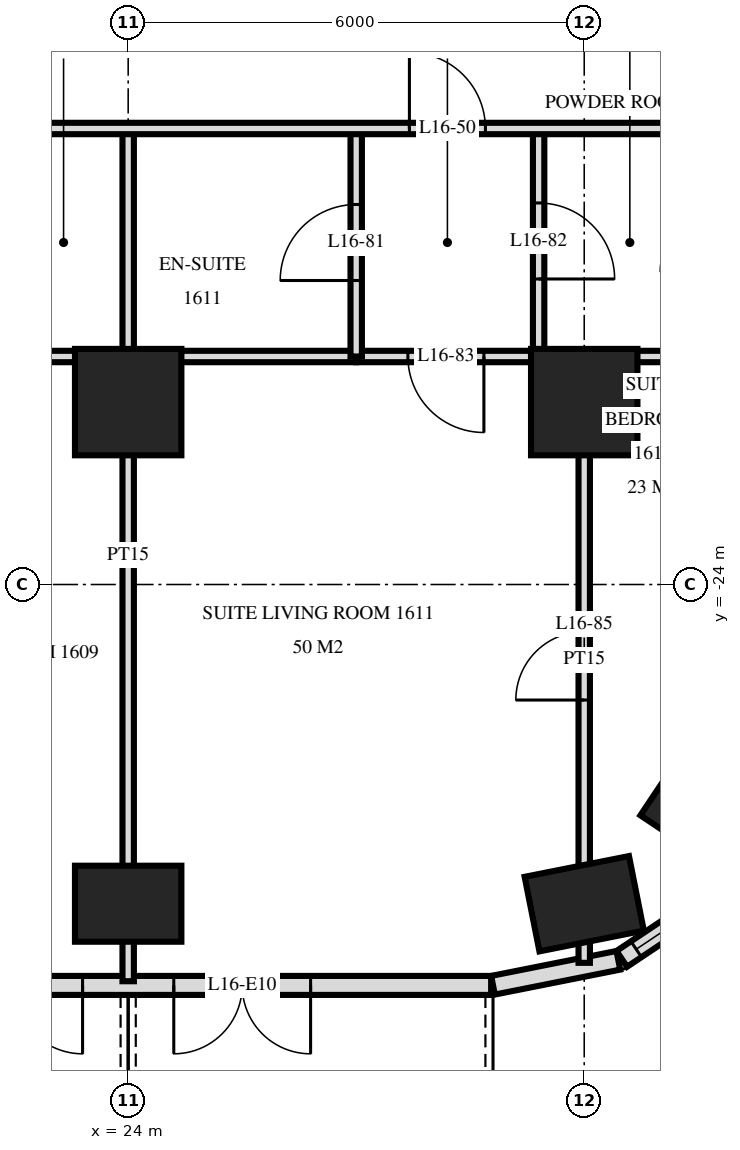
"""IFC4 building model, lengths in metres.
Left out: names, types, materials, properties, quantities, classifications, styles, units other than length and angle.
Written with IfcOpenShell. Run it as: python <this file> out.ifc"""

import sys

from ifc_helpers import new_model, si_unit, direction, frame, frame_2d, origin, origin_2d, place, context, subcontext, project, spatial, rectangle, extrude, element, fill, save


model = new_model("IFC4")
c1 = context("Model", 3, precision=1e-05, world=origin(), true_north=direction((0.0, 1.0)))
c2 = subcontext(c1, "Body", "Model", "MODEL_VIEW")
j1 = project(units=[si_unit("LENGTHUNIT", "METRE"), si_unit("PLANEANGLEUNIT", "RADIAN")], contexts=[c1])
p1 = place(None, origin())
s1 = spatial("IfcSite", under=j1, at=p1, CompositionType="ELEMENT")
p2 = place(p1, origin())
s2 = spatial("IfcBuilding", under=s1, at=p2, CompositionType="ELEMENT")
p3 = place(p2, frame((0.0, 0.0, 67.2)))
s3 = spatial("IfcBuildingStorey", under=s2, at=p3, CompositionType="ELEMENT", Elevation=67.2)
p4 = place(p3, frame((24.0, -28.2, 0.0), z_axis=(0.0, 0.0, 1.0), x_axis=(1.0, 0.0, 0.0)))
e1 = element("IfcColumn", 1, at=p4, inside=s3, PredefinedType="COLUMN", context=c2, shape_type="SweptSolid", body=[
    extrude(rectangle(XDim=1.4, YDim=1.0, at=origin_2d()), origin(), (0.0, 0.0, 1.0), 3.6),
])
p5 = place(p3, frame((24.0, -21.6, 0.0), z_axis=(0.0, 0.0, 1.0), x_axis=(1.0, 0.0, 0.0)))
e2 = element("IfcColumn", 2, at=p5, inside=s3, PredefinedType="COLUMN", context=c2, shape_type="SweptSolid", body=[
    extrude(rectangle(XDim=1.4, YDim=1.4, at=origin_2d()), origin(), (0.0, 0.0, 1.0), 3.6),
])
p6 = place(p3, frame((30.0, -28.2, 0.0), z_axis=(0.0, 0.0, 1.0), x_axis=(0.980792089743, 0.195056086032, 0.0)))
e3 = element("IfcColumn", 3, at=p6, inside=s3, PredefinedType="COLUMN", context=c2, shape_type="SweptSolid", body=[
    extrude(rectangle(XDim=1.4, YDim=1.0, at=origin_2d()), origin(), (0.0, 0.0, 1.0), 3.6),
])
p7 = place(p3, frame((30.0, -21.6, 0.0), z_axis=(0.0, 0.0, 1.0), x_axis=(1.0, 0.0, 0.0)))
e4 = element("IfcColumn", 4, at=p7, inside=s3, PredefinedType="COLUMN", context=c2, shape_type="SweptSolid", body=[
    extrude(rectangle(XDim=1.4, YDim=1.4, at=origin_2d()), origin(), (0.0, 0.0, 1.0), 3.6),
])
p8 = place(p3, frame((31.544, -26.733, 0.0), z_axis=(0.0, 0.0, 1.0), x_axis=(0.555584744817, 0.831459915646, 0.0)))
e5 = element("IfcColumn", 5, at=p8, inside=s3, PredefinedType="COLUMN", context=c2, shape_type="SweptSolid", body=[
    extrude(rectangle(XDim=1.4, YDim=1.0, at=origin_2d()), origin(), (0.0, 0.0, 1.0), 3.6),
])
p9 = place(p3, frame((-28.775, -29.275, 0.0), z_axis=(0.0, 0.0, 1.0), x_axis=(1.0, 0.0, 0.0)))
e6 = element("IfcWall", 6, at=p9, inside=s3, PredefinedType="SOLIDWALL", context=c2, shape_type="SweptSolid", body=[
    extrude(rectangle(XDim=57.551, YDim=0.25, at=frame_2d((28.775, 0.0))), origin(), (0.0, 0.0, 1.0), 3.32),
])
p10 = place(p9, frame((0.575, 0.0, 0.0)))
e7 = element("IfcOpeningElement", 7, at=p10, cuts=e6, PredefinedType="OPENING", context=c2, shape_type="SweptSolid", body=[
    extrude(rectangle(XDim=1.8, YDim=2.4, at=frame_2d((0.9, 1.2))), frame((0.0, 0.135, 0.0), z_axis=(0.0, -1.0, 0.0), x_axis=(1.0, 0.0, 0.0)), (0.0, 0.0, 1.0), 0.27),
])
p11 = place(p9, frame((5.075, 0.0, 0.3)))
e8 = element("IfcOpeningElement", 8, at=p11, cuts=e6, PredefinedType="OPENING", context=c2, shape_type="SweptSolid", body=[
    extrude(rectangle(XDim=2.4, YDim=2.1, at=frame_2d((1.2, 1.05))), frame((0.0, 0.135, 0.0), z_axis=(0.0, -1.0, 0.0), x_axis=(1.0, 0.0, 0.0)), (0.0, 0.0, 1.0), 0.27),
])
p12 = place(p9, frame((8.375, 0.0, 0.0)))
e9 = element("IfcOpeningElement", 9, at=p12, cuts=e6, PredefinedType="OPENING", context=c2, shape_type="SweptSolid", body=[
    extrude(rectangle(XDim=1.8, YDim=2.4, at=frame_2d((0.9, 1.2))), frame((0.0, 0.135, 0.0), z_axis=(0.0, -1.0, 0.0), x_axis=(1.0, 0.0, 0.0)), (0.0, 0.0, 1.0), 0.27),
])
p13 = place(p9, frame((11.375, 0.0, 0.0)))
e10 = element("IfcOpeningElement", 10, at=p13, cuts=e6, PredefinedType="OPENING", context=c2, shape_type="SweptSolid", body=[
    extrude(rectangle(XDim=1.8, YDim=2.4, at=frame_2d((0.9, 1.2))), frame((0.0, 0.135, 0.0), z_axis=(0.0, -1.0, 0.0), x_axis=(1.0, 0.0, 0.0)), (0.0, 0.0, 1.0), 0.27),
])
p14 = place(p9, frame((14.075, 0.0, 0.3)))
e11 = element("IfcOpeningElement", 11, at=p14, cuts=e6, PredefinedType="OPENING", context=c2, shape_type="SweptSolid", body=[
    extrude(rectangle(XDim=2.4, YDim=2.1, at=frame_2d((1.2, 1.05))), frame((0.0, 0.135, 0.0), z_axis=(0.0, -1.0, 0.0), x_axis=(1.0, 0.0, 0.0)), (0.0, 0.0, 1.0), 0.27),
])
p15 = place(p9, frame((17.375, 0.0, 0.0)))
e12 = element("IfcOpeningElement", 12, at=p15, cuts=e6, PredefinedType="OPENING", context=c2, shape_type="SweptSolid", body=[
    extrude(rectangle(XDim=1.8, YDim=2.4, at=frame_2d((0.9, 1.2))), frame((0.0, 0.135, 0.0), z_axis=(0.0, -1.0, 0.0), x_axis=(1.0, 0.0, 0.0)), (0.0, 0.0, 1.0), 0.27),
])
p16 = place(p9, frame((20.075, 0.0, 0.3)))
e13 = element("IfcOpeningElement", 13, at=p16, cuts=e6, PredefinedType="OPENING", context=c2, shape_type="SweptSolid", body=[
    extrude(rectangle(XDim=2.4, YDim=2.1, at=frame_2d((1.2, 1.05))), frame((0.0, 0.135, 0.0), z_axis=(0.0, -1.0, 0.0), x_axis=(1.0, 0.0, 0.0)), (0.0, 0.0, 1.0), 0.27),
])
p17 = place(p9, frame((23.075, 0.0, 0.3)))
e14 = element("IfcOpeningElement", 14, at=p17, cuts=e6, PredefinedType="OPENING", context=c2, shape_type="SweptSolid", body=[
    extrude(rectangle(XDim=2.4, YDim=2.1, at=frame_2d((1.2, 1.05))), frame((0.0, 0.135, 0.0), z_axis=(0.0, -1.0, 0.0), x_axis=(1.0, 0.0, 0.0)), (0.0, 0.0, 1.0), 0.27),
])
p18 = place(p9, frame((26.375, 0.0, 0.0)))
e15 = element("IfcOpeningElement", 15, at=p18, cuts=e6, PredefinedType="OPENING", context=c2, shape_type="SweptSolid", body=[
    extrude(rectangle(XDim=1.8, YDim=2.4, at=frame_2d((0.9, 1.2))), frame((0.0, 0.135, 0.0), z_axis=(0.0, -1.0, 0.0), x_axis=(1.0, 0.0, 0.0)), (0.0, 0.0, 1.0), 0.27),
])
p19 = place(p9, frame((29.375, 0.0, 0.0)))
e16 = element("IfcOpeningElement", 16, at=p19, cuts=e6, PredefinedType="OPENING", context=c2, shape_type="SweptSolid", body=[
    extrude(rectangle(XDim=1.8, YDim=2.4, at=frame_2d((0.9, 1.2))), frame((0.0, 0.135, 0.0), z_axis=(0.0, -1.0, 0.0), x_axis=(1.0, 0.0, 0.0)), (0.0, 0.0, 1.0), 0.27),
])
p20 = place(p9, frame((32.075, 0.0, 0.3)))
e17 = element("IfcOpeningElement", 17, at=p20, cuts=e6, PredefinedType="OPENING", context=c2, shape_type="SweptSolid", body=[
    extrude(rectangle(XDim=2.4, YDim=2.1, at=frame_2d((1.2, 1.05))), frame((0.0, 0.135, 0.0), z_axis=(0.0, -1.0, 0.0), x_axis=(1.0, 0.0, 0.0)), (0.0, 0.0, 1.0), 0.27),
])
p21 = place(p9, frame((35.375, 0.0, 0.0)))
e18 = element("IfcOpeningElement", 18, at=p21, cuts=e6, PredefinedType="OPENING", context=c2, shape_type="SweptSolid", body=[
    extrude(rectangle(XDim=1.8, YDim=2.4, at=frame_2d((0.9, 1.2))), frame((0.0, 0.135, 0.0), z_axis=(0.0, -1.0, 0.0), x_axis=(1.0, 0.0, 0.0)), (0.0, 0.0, 1.0), 0.27),
])
p22 = place(p9, frame((38.075, 0.0, 0.3)))
e19 = element("IfcOpeningElement", 19, at=p22, cuts=e6, PredefinedType="OPENING", context=c2, shape_type="SweptSolid", body=[
    extrude(rectangle(XDim=2.4, YDim=2.1, at=frame_2d((1.2, 1.05))), frame((0.0, 0.135, 0.0), z_axis=(0.0, -1.0, 0.0), x_axis=(1.0, 0.0, 0.0)), (0.0, 0.0, 1.0), 0.27),
])
p23 = place(p9, frame((41.075, 0.0, 0.3)))
e20 = element("IfcOpeningElement", 20, at=p23, cuts=e6, PredefinedType="OPENING", context=c2, shape_type="SweptSolid", body=[
    extrude(rectangle(XDim=2.4, YDim=2.1, at=frame_2d((1.2, 1.05))), frame((0.0, 0.135, 0.0), z_axis=(0.0, -1.0, 0.0), x_axis=(1.0, 0.0, 0.0)), (0.0, 0.0, 1.0), 0.27),
])
p24 = place(p9, frame((44.375, 0.0, 0.0)))
e21 = element("IfcOpeningElement", 21, at=p24, cuts=e6, PredefinedType="OPENING", context=c2, shape_type="SweptSolid", body=[
    extrude(rectangle(XDim=1.8, YDim=2.4, at=frame_2d((0.9, 1.2))), frame((0.0, 0.135, 0.0), z_axis=(0.0, -1.0, 0.0), x_axis=(1.0, 0.0, 0.0)), (0.0, 0.0, 1.0), 0.27),
])
p25 = place(p9, frame((47.075, 0.0, 0.3)))
e22 = element("IfcOpeningElement", 22, at=p25, cuts=e6, PredefinedType="OPENING", context=c2, shape_type="SweptSolid", body=[
    extrude(rectangle(XDim=2.4, YDim=2.1, at=frame_2d((1.2, 1.05))), frame((0.0, 0.135, 0.0), z_axis=(0.0, -1.0, 0.0), x_axis=(1.0, 0.0, 0.0)), (0.0, 0.0, 1.0), 0.27),
])
p26 = place(p9, frame((50.375, 0.0, 0.0)))
e23 = element("IfcOpeningElement", 23, at=p26, cuts=e6, PredefinedType="OPENING", context=c2, shape_type="SweptSolid", body=[
    extrude(rectangle(XDim=1.8, YDim=2.4, at=frame_2d((0.9, 1.2))), frame((0.0, 0.135, 0.0), z_axis=(0.0, -1.0, 0.0), x_axis=(1.0, 0.0, 0.0)), (0.0, 0.0, 1.0), 0.27),
])
p27 = place(p9, frame((53.375, 0.0, 0.0)))
e24 = element("IfcOpeningElement", 24, at=p27, cuts=e6, PredefinedType="OPENING", context=c2, shape_type="SweptSolid", body=[
    extrude(rectangle(XDim=1.8, YDim=2.4, at=frame_2d((0.9, 1.2))), frame((0.0, 0.135, 0.0), z_axis=(0.0, -1.0, 0.0), x_axis=(1.0, 0.0, 0.0)), (0.0, 0.0, 1.0), 0.27),
])
p28 = place(p3, frame((28.8, -29.273, 0.0), z_axis=(0.0, 0.0, 1.0), x_axis=(0.980775640221, 0.19513878023, 0.0)))
e25 = element("IfcWall", 25, at=p28, inside=s3, PredefinedType="SOLIDWALL", context=c2, shape_type="SweptSolid", body=[
    extrude(rectangle(XDim=1.681, YDim=0.25, at=frame_2d((0.841, 0.0))), origin(), (0.0, 0.0, 1.0), 3.32),
])
p29 = place(p3, frame((30.494, -28.926, 0.0), z_axis=(0.0, 0.0, 1.0), x_axis=(0.831482937015, 0.55555029066, 0.0)))
e26 = element("IfcWall", 26, at=p29, inside=s3, PredefinedType="SOLIDWALL", context=c2, shape_type="SweptSolid", body=[
    extrude(rectangle(XDim=1.656, YDim=0.25, at=frame_2d((0.828, 0.0))), origin(), (0.0, 0.0, 1.0), 3.32),
])
p30 = place(p29, frame((0.228, 0.0, 0.9)))
e27 = element("IfcOpeningElement", 27, at=p30, cuts=e26, PredefinedType="OPENING", context=c2, shape_type="SweptSolid", body=[
    extrude(rectangle(XDim=1.2, YDim=1.5, at=frame_2d((0.6, 0.75))), frame((0.0, 0.135, 0.0), z_axis=(0.0, -1.0, 0.0), x_axis=(1.0, 0.0, 0.0)), (0.0, 0.0, 1.0), 0.27),
])
p31 = place(p3, frame((30.0, -28.978, 0.0), z_axis=(0.0, 0.0, 1.0), x_axis=(0.0, 1.0, 0.0)))
e28 = element("IfcWall", 28, at=p31, inside=s3, PredefinedType="PARTITIONING", context=c2, shape_type="SweptSolid", body=[
    extrude(rectangle(XDim=7.978, YDim=0.15, at=frame_2d((3.989, 0.0))), origin(), (0.0, 0.0, 1.0), 3.32),
])
p32 = place(p31, frame((3.458, 0.0, 0.0)))
e29 = element("IfcOpeningElement", 29, at=p32, cuts=e28, PredefinedType="OPENING", context=c2, shape_type="SweptSolid", body=[
    extrude(rectangle(XDim=0.9, YDim=2.1, at=frame_2d((0.45, 1.05))), frame((0.0, 0.085, 0.0), z_axis=(0.0, -1.0, 0.0), x_axis=(1.0, 0.0, 0.0)), (0.0, 0.0, 1.0), 0.17),
])
p33 = place(p3, frame((29.4, -21.0, 0.0), z_axis=(0.0, 0.0, 1.0), x_axis=(0.0, 1.0, 0.0)))
e30 = element("IfcWall", 30, at=p33, inside=s3, PredefinedType="PARTITIONING", context=c2, shape_type="SweptSolid", body=[
    extrude(rectangle(XDim=3.0, YDim=0.15, at=frame_2d((1.5, 0.0))), origin(), (0.0, 0.0, 1.0), 3.32),
])
p34 = place(p33, frame((1.02, 0.0, 0.0)))
e31 = element("IfcOpeningElement", 31, at=p34, cuts=e30, PredefinedType="OPENING", context=c2, shape_type="SweptSolid", body=[
    extrude(rectangle(XDim=1.0, YDim=2.1, at=frame_2d((0.5, 1.05))), frame((0.0, 0.085, 0.0), z_axis=(0.0, -1.0, 0.0), x_axis=(1.0, 0.0, 0.0)), (0.0, 0.0, 1.0), 0.17),
])
p35 = place(p3, frame((27.0, -21.0, 0.0), z_axis=(0.0, 0.0, 1.0), x_axis=(0.0, 1.0, 0.0)))
e32 = element("IfcWall", 32, at=p35, inside=s3, PredefinedType="PARTITIONING", context=c2, shape_type="SweptSolid", body=[
    extrude(rectangle(XDim=3.0, YDim=0.15, at=frame_2d((1.5, 0.0))), origin(), (0.0, 0.0, 1.0), 3.32),
])
p36 = place(p35, frame((1.0, 0.0, 0.0)))
e33 = element("IfcOpeningElement", 33, at=p36, cuts=e32, PredefinedType="OPENING", context=c2, shape_type="SweptSolid", body=[
    extrude(rectangle(XDim=1.0, YDim=2.1, at=frame_2d((0.5, 1.05))), frame((0.0, 0.085, 0.0), z_axis=(0.0, -1.0, 0.0), x_axis=(1.0, 0.0, 0.0)), (0.0, 0.0, 1.0), 0.17),
])
p37 = place(p3, frame((24.0, -29.22, 0.0), z_axis=(0.0, 0.0, 1.0), x_axis=(0.0, 1.0, 0.0)))
e34 = element("IfcWall", 34, at=p37, inside=s3, PredefinedType="PARTITIONING", context=c2, shape_type="SweptSolid", body=[
    extrude(rectangle(XDim=11.22, YDim=0.15, at=frame_2d((5.61, 0.0))), origin(), (0.0, 0.0, 1.0), 3.32),
])
p38 = place(p3, frame((27.0, -21.0, 0.0), z_axis=(0.0, 0.0, 1.0), x_axis=(1.0, 0.0, 0.0)))
e35 = element("IfcWall", 35, at=p38, inside=s3, PredefinedType="PARTITIONING", context=c2, shape_type="SweptSolid", body=[
    extrude(rectangle(XDim=2.4, YDim=0.15, at=frame_2d((1.2, 0.0))), origin(), (0.0, 0.0, 1.0), 3.32),
])
p39 = place(p38, frame((0.68, 0.0, 0.0)))
e36 = element("IfcOpeningElement", 36, at=p39, cuts=e35, PredefinedType="OPENING", context=c2, shape_type="SweptSolid", body=[
    extrude(rectangle(XDim=1.0, YDim=2.1, at=frame_2d((0.5, 1.05))), frame((0.0, 0.085, 0.0), z_axis=(0.0, -1.0, 0.0), x_axis=(1.0, 0.0, 0.0)), (0.0, 0.0, 1.0), 0.17),
])
p40 = place(p3, frame((22.3, -21.0, 0.0), z_axis=(0.0, 0.0, 1.0), x_axis=(1.0, 0.0, 0.0)))
e37 = element("IfcWall", 37, at=p40, inside=s3, PredefinedType="PARTITIONING", context=c2, shape_type="SweptSolid", body=[
    extrude(rectangle(XDim=4.7, YDim=0.15, at=frame_2d((2.35, 0.0))), origin(), (0.0, 0.0, 1.0), 3.32),
])
p41 = place(p3, frame((29.4, -21.0, 0.0), z_axis=(0.0, 0.0, 1.0), x_axis=(1.0, 0.0, 0.0)))
e38 = element("IfcWall", 38, at=p41, inside=s3, PredefinedType="PARTITIONING", context=c2, shape_type="SweptSolid", body=[
    extrude(rectangle(XDim=2.4, YDim=0.15, at=frame_2d((1.2, 0.0))), origin(), (0.0, 0.0, 1.0), 3.32),
])
p42 = place(p3, frame((-33.12, -18.0, 0.0), z_axis=(0.0, 0.0, 1.0), x_axis=(1.0, 0.0, 0.0)))
e39 = element("IfcWall", 39, at=p42, inside=s3, PredefinedType="PARTITIONING", context=c2, shape_type="SweptSolid", body=[
    extrude(rectangle(XDim=66.24, YDim=0.15, at=frame_2d((33.12, 0.0))), origin(), (0.0, 0.0, 1.0), 3.32),
])
p43 = place(p42, frame((15.27, 0.0, 0.0)))
e40 = element("IfcOpeningElement", 40, at=p43, cuts=e39, PredefinedType="OPENING", context=c2, shape_type="SweptSolid", body=[
    extrude(rectangle(XDim=1.0, YDim=2.1, at=frame_2d((0.5, 1.05))), frame((0.0, 0.085, 0.0), z_axis=(0.0, -1.0, 0.0), x_axis=(1.0, 0.0, 0.0)), (0.0, 0.0, 1.0), 0.17),
])
p44 = place(p42, frame((21.22, 0.0, 0.0)))
e41 = element("IfcOpeningElement", 41, at=p44, cuts=e39, PredefinedType="OPENING", context=c2, shape_type="SweptSolid", body=[
    extrude(rectangle(XDim=1.0, YDim=2.1, at=frame_2d((0.5, 1.05))), frame((0.0, 0.085, 0.0), z_axis=(0.0, -1.0, 0.0), x_axis=(1.0, 0.0, 0.0)), (0.0, 0.0, 1.0), 0.17),
])
p45 = place(p42, frame((24.27, 0.0, 0.0)))
e42 = element("IfcOpeningElement", 42, at=p45, cuts=e39, PredefinedType="OPENING", context=c2, shape_type="SweptSolid", body=[
    extrude(rectangle(XDim=1.0, YDim=2.1, at=frame_2d((0.5, 1.05))), frame((0.0, 0.085, 0.0), z_axis=(0.0, -1.0, 0.0), x_axis=(1.0, 0.0, 0.0)), (0.0, 0.0, 1.0), 0.17),
])
p46 = place(p42, frame((30.97, 0.0, 0.0)))
e43 = element("IfcOpeningElement", 43, at=p46, cuts=e39, PredefinedType="OPENING", context=c2, shape_type="SweptSolid", body=[
    extrude(rectangle(XDim=1.0, YDim=2.1, at=frame_2d((0.5, 1.05))), frame((0.0, 0.085, 0.0), z_axis=(0.0, -1.0, 0.0), x_axis=(1.0, 0.0, 0.0)), (0.0, 0.0, 1.0), 0.17),
])
p47 = place(p42, frame((40.42, 0.0, 0.0)))
e44 = element("IfcOpeningElement", 44, at=p47, cuts=e39, PredefinedType="OPENING", context=c2, shape_type="SweptSolid", body=[
    extrude(rectangle(XDim=1.0, YDim=2.1, at=frame_2d((0.5, 1.05))), frame((0.0, 0.085, 0.0), z_axis=(0.0, -1.0, 0.0), x_axis=(1.0, 0.0, 0.0)), (0.0, 0.0, 1.0), 0.17),
])
p48 = place(p42, frame((43.97, 0.0, 0.0)))
e45 = element("IfcOpeningElement", 45, at=p48, cuts=e39, PredefinedType="OPENING", context=c2, shape_type="SweptSolid", body=[
    extrude(rectangle(XDim=1.0, YDim=2.1, at=frame_2d((0.5, 1.05))), frame((0.0, 0.085, 0.0), z_axis=(0.0, -1.0, 0.0), x_axis=(1.0, 0.0, 0.0)), (0.0, 0.0, 1.0), 0.17),
])
p49 = place(p42, frame((45.52, 0.0, 0.0)))
e46 = element("IfcOpeningElement", 46, at=p49, cuts=e39, PredefinedType="OPENING", context=c2, shape_type="SweptSolid", body=[
    extrude(rectangle(XDim=1.0, YDim=2.1, at=frame_2d((0.5, 1.05))), frame((0.0, 0.085, 0.0), z_axis=(0.0, -1.0, 0.0), x_axis=(1.0, 0.0, 0.0)), (0.0, 0.0, 1.0), 0.17),
])
p50 = place(p42, frame((52.97, 0.0, 0.0)))
e47 = element("IfcOpeningElement", 47, at=p50, cuts=e39, PredefinedType="OPENING", context=c2, shape_type="SweptSolid", body=[
    extrude(rectangle(XDim=1.0, YDim=2.1, at=frame_2d((0.5, 1.05))), frame((0.0, 0.085, 0.0), z_axis=(0.0, -1.0, 0.0), x_axis=(1.0, 0.0, 0.0)), (0.0, 0.0, 1.0), 0.17),
])
p51 = place(p42, frame((54.27, 0.0, 0.0)))
e48 = element("IfcOpeningElement", 48, at=p51, cuts=e39, PredefinedType="OPENING", context=c2, shape_type="SweptSolid", body=[
    extrude(rectangle(XDim=1.0, YDim=2.1, at=frame_2d((0.5, 1.05))), frame((0.0, 0.085, 0.0), z_axis=(0.0, -1.0, 0.0), x_axis=(1.0, 0.0, 0.0)), (0.0, 0.0, 1.0), 0.17),
])
p52 = place(p42, frame((13.42, 0.0, 0.0)))
e49 = element("IfcOpeningElement", 49, at=p52, cuts=e39, PredefinedType="OPENING", context=c2, shape_type="SweptSolid", body=[
    extrude(rectangle(XDim=1.0, YDim=2.1, at=frame_2d((0.5, 1.05))), frame((0.0, 0.085, 0.0), z_axis=(0.0, -1.0, 0.0), x_axis=(1.0, 0.0, 0.0)), (0.0, 0.0, 1.0), 0.17),
])
p53 = place(p42, frame((60.82, 0.0, 0.0)))
e50 = element("IfcOpeningElement", 50, at=p53, cuts=e39, PredefinedType="OPENING", context=c2, shape_type="SweptSolid", body=[
    extrude(rectangle(XDim=1.0, YDim=2.1, at=frame_2d((0.5, 1.05))), frame((0.0, 0.085, 0.0), z_axis=(0.0, -1.0, 0.0), x_axis=(1.0, 0.0, 0.0)), (0.0, 0.0, 1.0), 0.17),
])
p54 = place(p30, origin())
e51 = element("IfcWindow", 51, at=p54, inside=s3, PartitioningType="SINGLE_PANEL", PredefinedType="WINDOW", context=c2, shape_type="SweptSolid", body=[
    extrude(rectangle(XDim=1.2, YDim=1.5, at=frame_2d((0.6, 0.75))), frame((0.0, 0.03, 0.0), z_axis=(0.0, -1.0, 0.0), x_axis=(1.0, 0.0, 0.0)), (0.0, 0.0, 1.0), 0.06),
])
fill(e27, e51)
p55 = place(p26, frame((0.9, 0.0, 0.0), z_axis=(0.0, 0.0, 1.0), x_axis=(-1.0, 0.0, 0.0)))
e52 = element("IfcDoor", 52, at=p55, inside=s3, OperationType="DOUBLE_DOOR_SINGLE_SWING", PredefinedType="DOOR", context=c2, shape_type="SweptSolid", body=[
    extrude(rectangle(XDim=1.8, YDim=2.4, at=frame_2d((0.0, 1.2))), frame((0.0, -0.025, 0.0), z_axis=(0.0, 1.0, 0.0), x_axis=(-1.0, 0.0, 0.0)), (0.0, 0.0, 1.0), 0.05),
])
fill(e23, e52)
p56 = place(p27, frame((0.9, 0.0, 0.0), z_axis=(0.0, 0.0, 1.0), x_axis=(-1.0, 0.0, 0.0)))
e53 = element("IfcDoor", 53, at=p56, inside=s3, OperationType="DOUBLE_DOOR_SINGLE_SWING", PredefinedType="DOOR", context=c2, shape_type="SweptSolid", body=[
    extrude(rectangle(XDim=1.8, YDim=2.4, at=frame_2d((0.0, 1.2))), frame((0.0, -0.025, 0.0), z_axis=(0.0, 1.0, 0.0), x_axis=(-1.0, 0.0, 0.0)), (0.0, 0.0, 1.0), 0.05),
])
fill(e24, e53)
p57 = place(p53, origin())
e54 = element("IfcDoor", 54, at=p57, inside=s3, OperationType="SINGLE_SWING_RIGHT", PredefinedType="DOOR", context=c2, shape_type="SweptSolid", body=[
    extrude(rectangle(XDim=1.0, YDim=2.1, at=frame_2d((0.5, 1.05))), frame((0.0, 0.025, 0.0), z_axis=(0.0, -1.0, 0.0), x_axis=(1.0, 0.0, 0.0)), (0.0, 0.0, 1.0), 0.05),
])
fill(e50, e54)
p58 = place(p36, origin())
e55 = element("IfcDoor", 55, at=p58, inside=s3, OperationType="SINGLE_SWING_RIGHT", PredefinedType="DOOR", context=c2, shape_type="SweptSolid", body=[
    extrude(rectangle(XDim=1.0, YDim=2.1, at=frame_2d((0.5, 1.05))), frame((0.0, 0.025, 0.0), z_axis=(0.0, -1.0, 0.0), x_axis=(1.0, 0.0, 0.0)), (0.0, 0.0, 1.0), 0.05),
])
fill(e33, e55)
p59 = place(p34, frame((0.5, 0.0, 0.0), z_axis=(0.0, 0.0, 1.0), x_axis=(-1.0, 0.0, 0.0)))
e56 = element("IfcDoor", 56, at=p59, inside=s3, OperationType="SINGLE_SWING_LEFT", PredefinedType="DOOR", context=c2, shape_type="SweptSolid", body=[
    extrude(rectangle(XDim=1.0, YDim=2.1, at=frame_2d((0.0, 1.05))), frame((0.0, -0.025, 0.0), z_axis=(0.0, 1.0, 0.0), x_axis=(-1.0, 0.0, 0.0)), (0.0, 0.0, 1.0), 0.05),
])
fill(e31, e56)
p60 = place(p39, frame((0.5, 0.0, 0.0), z_axis=(0.0, 0.0, 1.0), x_axis=(-1.0, 0.0, 0.0)))
e57 = element("IfcDoor", 57, at=p60, inside=s3, OperationType="SINGLE_SWING_RIGHT", PredefinedType="DOOR", context=c2, shape_type="SweptSolid", body=[
    extrude(rectangle(XDim=1.0, YDim=2.1, at=frame_2d((0.0, 1.05))), frame((0.0, -0.025, 0.0), z_axis=(0.0, 1.0, 0.0), x_axis=(-1.0, 0.0, 0.0)), (0.0, 0.0, 1.0), 0.05),
])
fill(e36, e57)
p61 = place(p32, origin())
e58 = element("IfcDoor", 58, at=p61, inside=s3, OperationType="SINGLE_SWING_RIGHT", PredefinedType="DOOR", context=c2, shape_type="SweptSolid", body=[
    extrude(rectangle(XDim=0.9, YDim=2.1, at=frame_2d((0.45, 1.05))), frame((0.0, 0.025, 0.0), z_axis=(0.0, -1.0, 0.0), x_axis=(1.0, 0.0, 0.0)), (0.0, 0.0, 1.0), 0.05),
])
fill(e29, e58)
save(model, sys.argv[1])
